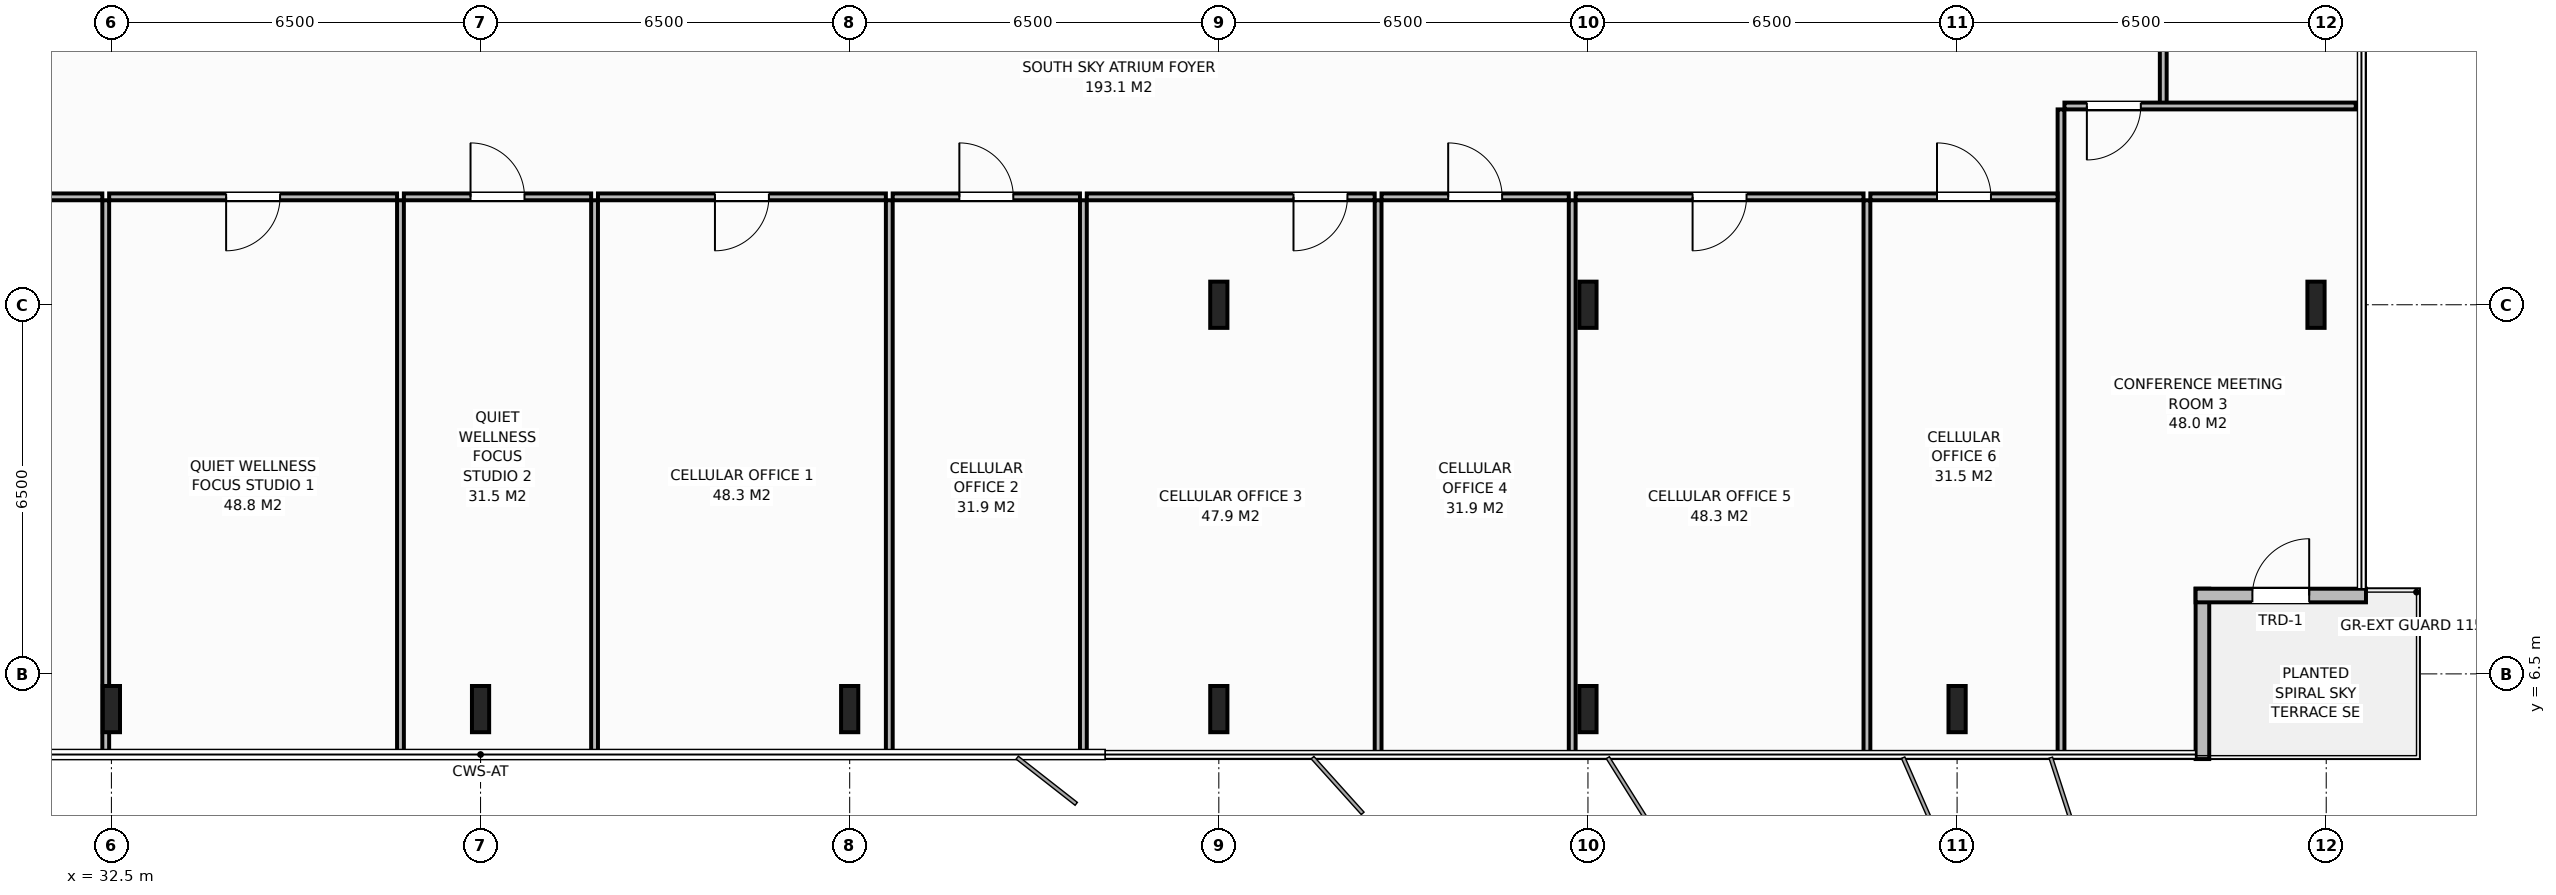
"""IFC4 building model, lengths in metres.
Left out: names, types, materials, properties, quantities, classifications, styles, units other than length and angle.
Written with IfcOpenShell. Run it as: python <this file> out.ifc"""

import sys

from ifc_helpers import new_model, si_unit, direction, frame, frame_2d, origin, origin_2d, place, context, subcontext, project, spatial, rectangle, i_section, extrude, element, fill, save


model = new_model("IFC4")
c1 = context("Model", 3, precision=1e-05, world=origin(), true_north=direction((0.0, 1.0)))
c2 = subcontext(c1, "Body", "Model", "MODEL_VIEW")
j1 = project(units=[si_unit("LENGTHUNIT", "METRE"), si_unit("PLANEANGLEUNIT", "RADIAN")], contexts=[c1])
p1 = place(None, origin())
s1 = spatial("IfcSite", under=j1, at=p1, CompositionType="ELEMENT")
p2 = place(p1, origin())
s2 = spatial("IfcBuilding", under=s1, at=p2, CompositionType="ELEMENT")
p3 = place(p2, frame((0.0, 0.0, 240.4)))
s3 = spatial("IfcBuildingStorey", under=s2, at=p3, CompositionType="ELEMENT", Elevation=240.4)
for number, where, z_axis, x_axis in (
    (1, (58.5, 13.0, 0.0), (0.0, 0.0, 1.0), (1.0, 0.0, 0.0)),
    (2, (52.0, 13.0, 0.0), (0.0, 0.0, 1.0), (1.0, 0.0, 0.0)),
    (3, (32.5, 5.88, 0.0), (0.0, 0.0, 1.0), (1.0, 0.0, 0.0)),
    (4, (39.0, 5.88, 0.0), (0.0, 0.0, 1.0), (1.0, 0.0, 0.0)),
    (5, (45.5, 5.88, 0.0), (0.0, 0.0, 1.0), (1.0, 0.0, 0.0)),
    (6, (52.0, 5.88, 0.0), (0.0, 0.0, 1.0), (1.0, 0.0, 0.0)),
    (7, (58.5, 5.88, 0.0), (0.0, 0.0, 1.0), (1.0, 0.0, 0.0)),
    (8, (65.0, 5.88, 0.0), (0.0, 0.0, 1.0), (1.0, 0.0, 0.0)),
    (9, (71.32, 13.0, 0.0), (0.0, 0.0, 1.0), (1.0, 0.0, 0.0)),
):
    element("IfcColumn", number, at=place(p3, frame(where, z_axis=z_axis, x_axis=x_axis)), inside=s3, PredefinedType="COLUMN", context=c2, shape_type="SweptSolid", body=[
        extrude(i_section(OverallWidth=0.303, OverallDepth=0.814, WebThickness=0.021, FlangeThickness=0.04, at=origin_2d()), origin(), (0.0, 0.0, 1.0), 3.8),
    ])
p4 = place(p3, frame((69.32, 8.0, 0.0), z_axis=(0.0, 0.0, 1.0), x_axis=(0.0, -1.0, 0.0)))
e10 = element("IfcWall", 10, at=p4, inside=s3, PredefinedType="STANDARD", context=c2, shape_type="SweptSolid", body=[
    extrude(rectangle(XDim=3.0, YDim=0.24, at=frame_2d((1.5, 0.0))), origin(), (0.0, 0.0, 1.0), 3.58),
])
p5 = place(p3, frame((72.2, 7.88, 0.0), z_axis=(0.0, 0.0, 1.0), x_axis=(-1.0, 0.0, 0.0)))
e11 = element("IfcWall", 11, at=p5, inside=s3, PredefinedType="STANDARD", context=c2, shape_type="SweptSolid", body=[
    extrude(rectangle(XDim=3.0, YDim=0.24, at=frame_2d((1.5, 0.0))), origin(), (0.0, 0.0, 1.0), 3.58),
])
p6 = place(p5, frame((1.0, 0.0, 0.0)))
e12 = element("IfcOpeningElement", 12, at=p6, cuts=e11, PredefinedType="OPENING", context=c2, shape_type="SweptSolid", body=[
    extrude(rectangle(XDim=1.0, YDim=2.2, at=frame_2d((0.5, 1.1))), frame((0.0, 0.13, 0.0), z_axis=(0.0, -1.0, 0.0), x_axis=(1.0, 0.0, 0.0)), (0.0, 0.0, 1.0), 0.26),
])
p7 = place(p3, frame((68.63, 16.5, 0.0), z_axis=(0.0, 0.0, 1.0), x_axis=(0.0, 1.0, 0.0)))
e13 = element("IfcWall", 13, at=p7, inside=s3, PredefinedType="PARTITIONING", context=c2, shape_type="SweptSolid", body=[
    extrude(rectangle(XDim=2.1, YDim=0.12, at=frame_2d((1.05, 0.0))), origin(), (0.0, 0.0, 1.0), 3.58),
])
p8 = place(p3, frame((32.4, 5.02, 0.0), z_axis=(0.0, 0.0, 1.0), x_axis=(0.0, 1.0, 0.0)))
e14 = element("IfcWall", 14, at=p8, inside=s3, PredefinedType="PARTITIONING", context=c2, shape_type="SweptSolid", body=[
    extrude(rectangle(XDim=9.82, YDim=0.12, at=frame_2d((4.91, 0.0))), origin(), (0.0, 0.0, 1.0), 2.88),
])
p9 = place(p3, frame((26.42, 14.9, 0.0), z_axis=(0.0, 0.0, 1.0), x_axis=(1.0, 0.0, 0.0)))
e15 = element("IfcWall", 15, at=p9, inside=s3, PredefinedType="PARTITIONING", context=c2, shape_type="SweptSolid", body=[
    extrude(rectangle(XDim=5.92, YDim=0.12, at=frame_2d((2.96, 0.0))), origin(), (0.0, 0.0, 1.0), 3.58),
])
p10 = place(p9, frame((2.485, 0.0, 0.0)))
e16 = element("IfcOpeningElement", 16, at=p10, cuts=e15, PredefinedType="OPENING", context=c2, shape_type="SweptSolid", body=[
    extrude(rectangle(XDim=0.95, YDim=2.15, at=frame_2d((0.475, 1.075))), frame((0.0, 0.07, 0.0), z_axis=(0.0, -1.0, 0.0), x_axis=(1.0, 0.0, 0.0)), (0.0, 0.0, 1.0), 0.14),
])
p11 = place(p3, frame((37.59, 5.02, 0.0), z_axis=(0.0, 0.0, 1.0), x_axis=(0.0, 1.0, 0.0)))
e17 = element("IfcWall", 17, at=p11, inside=s3, PredefinedType="PARTITIONING", context=c2, shape_type="SweptSolid", body=[
    extrude(rectangle(XDim=9.82, YDim=0.12, at=frame_2d((4.91, 0.0))), origin(), (0.0, 0.0, 1.0), 3.58),
])
p12 = place(p3, frame((32.46, 14.9, 0.0), z_axis=(0.0, 0.0, 1.0), x_axis=(1.0, 0.0, 0.0)))
e18 = element("IfcWall", 18, at=p12, inside=s3, PredefinedType="PARTITIONING", context=c2, shape_type="SweptSolid", body=[
    extrude(rectangle(XDim=5.07, YDim=0.12, at=frame_2d((2.535, 0.0))), origin(), (0.0, 0.0, 1.0), 3.58),
])
p13 = place(p12, frame((2.06, 0.0, 0.0)))
e19 = element("IfcOpeningElement", 19, at=p13, cuts=e18, PredefinedType="OPENING", context=c2, shape_type="SweptSolid", body=[
    extrude(rectangle(XDim=0.95, YDim=2.15, at=frame_2d((0.475, 1.075))), frame((0.0, 0.07, 0.0), z_axis=(0.0, -1.0, 0.0), x_axis=(1.0, 0.0, 0.0)), (0.0, 0.0, 1.0), 0.14),
])
p14 = place(p3, frame((41.008, 5.02, 0.0), z_axis=(0.0, 0.0, 1.0), x_axis=(0.0, 1.0, 0.0)))
e20 = element("IfcWall", 20, at=p14, inside=s3, PredefinedType="PARTITIONING", context=c2, shape_type="SweptSolid", body=[
    extrude(rectangle(XDim=9.82, YDim=0.12, at=frame_2d((4.91, 0.0))), origin(), (0.0, 0.0, 1.0), 3.58),
])
p15 = place(p3, frame((37.65, 14.9, 0.0), z_axis=(0.0, 0.0, 1.0), x_axis=(1.0, 0.0, 0.0)))
e21 = element("IfcWall", 21, at=p15, inside=s3, PredefinedType="PARTITIONING", context=c2, shape_type="SweptSolid", body=[
    extrude(rectangle(XDim=3.298, YDim=0.12, at=frame_2d((1.649, 0.0))), origin(), (0.0, 0.0, 1.0), 3.58),
])
p16 = place(p15, frame((1.174, 0.0, 0.0)))
e22 = element("IfcOpeningElement", 22, at=p16, cuts=e21, PredefinedType="OPENING", context=c2, shape_type="SweptSolid", body=[
    extrude(rectangle(XDim=0.95, YDim=2.15, at=frame_2d((0.475, 1.075))), frame((0.0, 0.07, 0.0), z_axis=(0.0, -1.0, 0.0), x_axis=(1.0, 0.0, 0.0)), (0.0, 0.0, 1.0), 0.14),
])
p17 = place(p3, frame((46.198, 5.02, 0.0), z_axis=(0.0, 0.0, 1.0), x_axis=(0.0, 1.0, 0.0)))
e23 = element("IfcWall", 23, at=p17, inside=s3, PredefinedType="PARTITIONING", context=c2, shape_type="SweptSolid", body=[
    extrude(rectangle(XDim=9.82, YDim=0.12, at=frame_2d((4.91, 0.0))), origin(), (0.0, 0.0, 1.0), 3.58),
])
p18 = place(p3, frame((41.067, 14.9, 0.0), z_axis=(0.0, 0.0, 1.0), x_axis=(1.0, 0.0, 0.0)))
e24 = element("IfcWall", 24, at=p18, inside=s3, PredefinedType="PARTITIONING", context=c2, shape_type="SweptSolid", body=[
    extrude(rectangle(XDim=5.07, YDim=0.12, at=frame_2d((2.535, 0.0))), origin(), (0.0, 0.0, 1.0), 3.58),
])
p19 = place(p18, frame((2.06, 0.0, 0.0)))
e25 = element("IfcOpeningElement", 25, at=p19, cuts=e24, PredefinedType="OPENING", context=c2, shape_type="SweptSolid", body=[
    extrude(rectangle(XDim=0.95, YDim=2.15, at=frame_2d((0.475, 1.075))), frame((0.0, 0.07, 0.0), z_axis=(0.0, -1.0, 0.0), x_axis=(1.0, 0.0, 0.0)), (0.0, 0.0, 1.0), 0.14),
])
p20 = place(p3, frame((49.615, 5.02, 0.0), z_axis=(0.0, 0.0, 1.0), x_axis=(0.0, 1.0, 0.0)))
e26 = element("IfcWall", 26, at=p20, inside=s3, PredefinedType="PARTITIONING", context=c2, shape_type="SweptSolid", body=[
    extrude(rectangle(XDim=9.82, YDim=0.12, at=frame_2d((4.91, 0.0))), origin(), (0.0, 0.0, 1.0), 3.58),
])
p21 = place(p3, frame((46.257, 14.9, 0.0), z_axis=(0.0, 0.0, 1.0), x_axis=(1.0, 0.0, 0.0)))
e27 = element("IfcWall", 27, at=p21, inside=s3, PredefinedType="PARTITIONING", context=c2, shape_type="SweptSolid", body=[
    extrude(rectangle(XDim=3.298, YDim=0.12, at=frame_2d((1.649, 0.0))), origin(), (0.0, 0.0, 1.0), 3.58),
])
p22 = place(p21, frame((1.174, 0.0, 0.0)))
e28 = element("IfcOpeningElement", 28, at=p22, cuts=e27, PredefinedType="OPENING", context=c2, shape_type="SweptSolid", body=[
    extrude(rectangle(XDim=0.95, YDim=2.15, at=frame_2d((0.475, 1.075))), frame((0.0, 0.07, 0.0), z_axis=(0.0, -1.0, 0.0), x_axis=(1.0, 0.0, 0.0)), (0.0, 0.0, 1.0), 0.14),
])
p23 = place(p3, frame((54.805, 5.02, 0.0), z_axis=(0.0, 0.0, 1.0), x_axis=(0.0, 1.0, 0.0)))
e29 = element("IfcWall", 29, at=p23, inside=s3, PredefinedType="PARTITIONING", context=c2, shape_type="SweptSolid", body=[
    extrude(rectangle(XDim=9.82, YDim=0.12, at=frame_2d((4.91, 0.0))), origin(), (0.0, 0.0, 1.0), 3.58),
])
p24 = place(p3, frame((49.675, 14.9, 0.0), z_axis=(0.0, 0.0, 1.0), x_axis=(1.0, 0.0, 0.0)))
e30 = element("IfcWall", 30, at=p24, inside=s3, PredefinedType="PARTITIONING", context=c2, shape_type="SweptSolid", body=[
    extrude(rectangle(XDim=5.07, YDim=0.12, at=frame_2d((2.535, 0.0))), origin(), (0.0, 0.0, 1.0), 3.58),
])
p25 = place(p24, frame((3.64, 0.0, 0.0)))
e31 = element("IfcOpeningElement", 31, at=p25, cuts=e30, PredefinedType="OPENING", context=c2, shape_type="SweptSolid", body=[
    extrude(rectangle(XDim=0.95, YDim=2.15, at=frame_2d((0.475, 1.075))), frame((0.0, 0.07, 0.0), z_axis=(0.0, -1.0, 0.0), x_axis=(1.0, 0.0, 0.0)), (0.0, 0.0, 1.0), 0.14),
])
p26 = place(p3, frame((58.223, 5.02, 0.0), z_axis=(0.0, 0.0, 1.0), x_axis=(0.0, 1.0, 0.0)))
e32 = element("IfcWall", 32, at=p26, inside=s3, PredefinedType="PARTITIONING", context=c2, shape_type="SweptSolid", body=[
    extrude(rectangle(XDim=9.82, YDim=0.12, at=frame_2d((4.91, 0.0))), origin(), (0.0, 0.0, 1.0), 3.58),
])
p27 = place(p3, frame((54.865, 14.9, 0.0), z_axis=(0.0, 0.0, 1.0), x_axis=(1.0, 0.0, 0.0)))
e33 = element("IfcWall", 33, at=p27, inside=s3, PredefinedType="PARTITIONING", context=c2, shape_type="SweptSolid", body=[
    extrude(rectangle(XDim=3.298, YDim=0.12, at=frame_2d((1.649, 0.0))), origin(), (0.0, 0.0, 1.0), 3.58),
])
p28 = place(p27, frame((1.174, 0.0, 0.0)))
e34 = element("IfcOpeningElement", 34, at=p28, cuts=e33, PredefinedType="OPENING", context=c2, shape_type="SweptSolid", body=[
    extrude(rectangle(XDim=0.95, YDim=2.15, at=frame_2d((0.475, 1.075))), frame((0.0, 0.07, 0.0), z_axis=(0.0, -1.0, 0.0), x_axis=(1.0, 0.0, 0.0)), (0.0, 0.0, 1.0), 0.14),
])
p29 = place(p3, frame((63.413, 5.02, 0.0), z_axis=(0.0, 0.0, 1.0), x_axis=(0.0, 1.0, 0.0)))
e35 = element("IfcWall", 35, at=p29, inside=s3, PredefinedType="PARTITIONING", context=c2, shape_type="SweptSolid", body=[
    extrude(rectangle(XDim=9.82, YDim=0.12, at=frame_2d((4.91, 0.0))), origin(), (0.0, 0.0, 1.0), 3.58),
])
p30 = place(p3, frame((58.283, 14.9, 0.0), z_axis=(0.0, 0.0, 1.0), x_axis=(1.0, 0.0, 0.0)))
e36 = element("IfcWall", 36, at=p30, inside=s3, PredefinedType="PARTITIONING", context=c2, shape_type="SweptSolid", body=[
    extrude(rectangle(XDim=5.07, YDim=0.12, at=frame_2d((2.535, 0.0))), origin(), (0.0, 0.0, 1.0), 3.58),
])
p31 = place(p30, frame((2.06, 0.0, 0.0)))
e37 = element("IfcOpeningElement", 37, at=p31, cuts=e36, PredefinedType="OPENING", context=c2, shape_type="SweptSolid", body=[
    extrude(rectangle(XDim=0.95, YDim=2.15, at=frame_2d((0.475, 1.075))), frame((0.0, 0.07, 0.0), z_axis=(0.0, -1.0, 0.0), x_axis=(1.0, 0.0, 0.0)), (0.0, 0.0, 1.0), 0.14),
])
p32 = place(p3, frame((66.83, 5.02, 0.0), z_axis=(0.0, 0.0, 1.0), x_axis=(0.0, 1.0, 0.0)))
e38 = element("IfcWall", 38, at=p32, inside=s3, PredefinedType="PARTITIONING", context=c2, shape_type="SweptSolid", body=[
    extrude(rectangle(XDim=11.42, YDim=0.12, at=frame_2d((5.71, 0.0))), origin(), (0.0, 0.0, 1.0), 3.58),
])
p33 = place(p3, frame((63.472, 14.9, 0.0), z_axis=(0.0, 0.0, 1.0), x_axis=(1.0, 0.0, 0.0)))
e39 = element("IfcWall", 39, at=p33, inside=s3, PredefinedType="PARTITIONING", context=c2, shape_type="SweptSolid", body=[
    extrude(rectangle(XDim=3.298, YDim=0.12, at=frame_2d((1.649, 0.0))), origin(), (0.0, 0.0, 1.0), 3.58),
])
p34 = place(p33, frame((1.174, 0.0, 0.0)))
e40 = element("IfcOpeningElement", 40, at=p34, cuts=e39, PredefinedType="OPENING", context=c2, shape_type="SweptSolid", body=[
    extrude(rectangle(XDim=0.95, YDim=2.15, at=frame_2d((0.475, 1.075))), frame((0.0, 0.07, 0.0), z_axis=(0.0, -1.0, 0.0), x_axis=(1.0, 0.0, 0.0)), (0.0, 0.0, 1.0), 0.14),
])
p35 = place(p3, frame((66.89, 16.5, 0.0), z_axis=(0.0, 0.0, 1.0), x_axis=(1.0, 0.0, 0.0)))
e41 = element("IfcWall", 41, at=p35, inside=s3, PredefinedType="PARTITIONING", context=c2, shape_type="SweptSolid", body=[
    extrude(rectangle(XDim=5.13, YDim=0.12, at=frame_2d((2.565, 0.0))), origin(), (0.0, 0.0, 1.0), 3.58),
])
p36 = place(p35, frame((0.395, 0.0, 0.0)))
e42 = element("IfcOpeningElement", 42, at=p36, cuts=e41, PredefinedType="OPENING", context=c2, shape_type="SweptSolid", body=[
    extrude(rectangle(XDim=0.95, YDim=2.15, at=frame_2d((0.475, 1.075))), frame((0.0, 0.07, 0.0), z_axis=(0.0, -1.0, 0.0), x_axis=(1.0, 0.0, 0.0)), (0.0, 0.0, 1.0), 0.14),
])
p37 = place(p6, origin())
e43 = element("IfcDoor", 43, at=p37, inside=s3, OperationType="SINGLE_SWING_RIGHT", PredefinedType="DOOR", context=c2, shape_type="SweptSolid", body=[
    extrude(rectangle(XDim=1.0, YDim=2.2, at=frame_2d((0.5, 1.1))), frame((0.0, 0.025, 0.0), z_axis=(0.0, -1.0, 0.0), x_axis=(1.0, 0.0, 0.0)), (0.0, 0.0, 1.0), 0.05),
])
fill(e12, e43)
p38 = place(p13, origin())
e44 = element("IfcDoor", 44, at=p38, inside=s3, OperationType="SINGLE_SWING_RIGHT", PredefinedType="DOOR", context=c2, shape_type="SweptSolid", body=[
    extrude(rectangle(XDim=0.95, YDim=2.15, at=frame_2d((0.475, 1.075))), frame((0.0, 0.025, 0.0), z_axis=(0.0, -1.0, 0.0), x_axis=(1.0, 0.0, 0.0)), (0.0, 0.0, 1.0), 0.05),
])
fill(e19, e44)
p39 = place(p16, origin())
e45 = element("IfcDoor", 45, at=p39, inside=s3, OperationType="SINGLE_SWING_LEFT", PredefinedType="DOOR", context=c2, shape_type="SweptSolid", body=[
    extrude(rectangle(XDim=0.95, YDim=2.15, at=frame_2d((0.475, 1.075))), frame((0.0, 0.025, 0.0), z_axis=(0.0, -1.0, 0.0), x_axis=(1.0, 0.0, 0.0)), (0.0, 0.0, 1.0), 0.05),
])
fill(e22, e45)
p40 = place(p19, origin())
e46 = element("IfcDoor", 46, at=p40, inside=s3, OperationType="SINGLE_SWING_RIGHT", PredefinedType="DOOR", context=c2, shape_type="SweptSolid", body=[
    extrude(rectangle(XDim=0.95, YDim=2.15, at=frame_2d((0.475, 1.075))), frame((0.0, 0.025, 0.0), z_axis=(0.0, -1.0, 0.0), x_axis=(1.0, 0.0, 0.0)), (0.0, 0.0, 1.0), 0.05),
])
fill(e25, e46)
p41 = place(p22, origin())
e47 = element("IfcDoor", 47, at=p41, inside=s3, OperationType="SINGLE_SWING_LEFT", PredefinedType="DOOR", context=c2, shape_type="SweptSolid", body=[
    extrude(rectangle(XDim=0.95, YDim=2.15, at=frame_2d((0.475, 1.075))), frame((0.0, 0.025, 0.0), z_axis=(0.0, -1.0, 0.0), x_axis=(1.0, 0.0, 0.0)), (0.0, 0.0, 1.0), 0.05),
])
fill(e28, e47)
p42 = place(p25, origin())
e48 = element("IfcDoor", 48, at=p42, inside=s3, OperationType="SINGLE_SWING_RIGHT", PredefinedType="DOOR", context=c2, shape_type="SweptSolid", body=[
    extrude(rectangle(XDim=0.95, YDim=2.15, at=frame_2d((0.475, 1.075))), frame((0.0, 0.025, 0.0), z_axis=(0.0, -1.0, 0.0), x_axis=(1.0, 0.0, 0.0)), (0.0, 0.0, 1.0), 0.05),
])
fill(e31, e48)
p43 = place(p28, origin())
e49 = element("IfcDoor", 49, at=p43, inside=s3, OperationType="SINGLE_SWING_LEFT", PredefinedType="DOOR", context=c2, shape_type="SweptSolid", body=[
    extrude(rectangle(XDim=0.95, YDim=2.15, at=frame_2d((0.475, 1.075))), frame((0.0, 0.025, 0.0), z_axis=(0.0, -1.0, 0.0), x_axis=(1.0, 0.0, 0.0)), (0.0, 0.0, 1.0), 0.05),
])
fill(e34, e49)
p44 = place(p31, origin())
e50 = element("IfcDoor", 50, at=p44, inside=s3, OperationType="SINGLE_SWING_RIGHT", PredefinedType="DOOR", context=c2, shape_type="SweptSolid", body=[
    extrude(rectangle(XDim=0.95, YDim=2.15, at=frame_2d((0.475, 1.075))), frame((0.0, 0.025, 0.0), z_axis=(0.0, -1.0, 0.0), x_axis=(1.0, 0.0, 0.0)), (0.0, 0.0, 1.0), 0.05),
])
fill(e37, e50)
p45 = place(p34, origin())
e51 = element("IfcDoor", 51, at=p45, inside=s3, OperationType="SINGLE_SWING_LEFT", PredefinedType="DOOR", context=c2, shape_type="SweptSolid", body=[
    extrude(rectangle(XDim=0.95, YDim=2.15, at=frame_2d((0.475, 1.075))), frame((0.0, 0.025, 0.0), z_axis=(0.0, -1.0, 0.0), x_axis=(1.0, 0.0, 0.0)), (0.0, 0.0, 1.0), 0.05),
])
fill(e40, e51)
p46 = place(p36, origin())
e52 = element("IfcDoor", 52, at=p46, inside=s3, OperationType="SINGLE_SWING_RIGHT", PredefinedType="DOOR", context=c2, shape_type="SweptSolid", body=[
    extrude(rectangle(XDim=0.95, YDim=2.15, at=frame_2d((0.475, 1.075))), frame((0.0, 0.025, 0.0), z_axis=(0.0, -1.0, 0.0), x_axis=(1.0, 0.0, 0.0)), (0.0, 0.0, 1.0), 0.05),
])
fill(e42, e52)
save(model, sys.argv[1])
